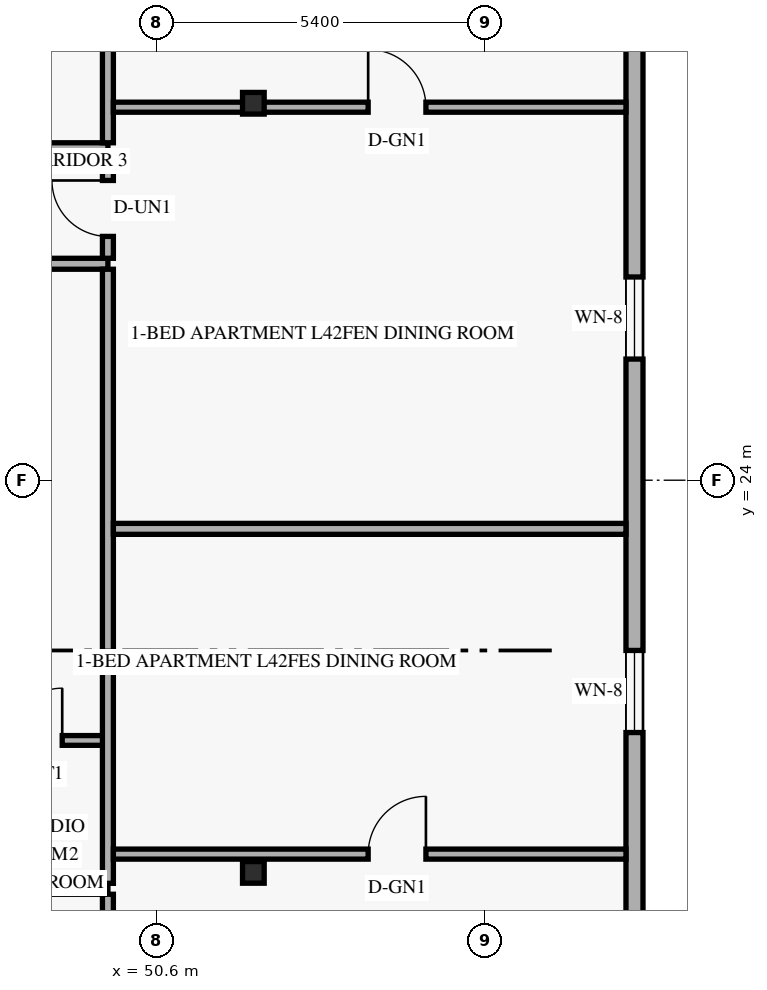
"""IFC4 building model, lengths in metres.
Left out: names, types, materials, properties, quantities, classifications, styles, units other than length and angle.
Written with IfcOpenShell. Run it as: python <this file> out.ifc"""

import sys

from ifc_helpers import new_model, si_unit, direction, frame, frame_2d, origin, origin_2d, place, context, subcontext, project, spatial, rectangle, hollow_rectangle, extrude, element, fill, save


model = new_model("IFC4")
c1 = context("Model", 3, precision=1e-05, world=origin(), true_north=direction((0.0, 1.0)))
c2 = subcontext(c1, "Body", "Model", "MODEL_VIEW")
j1 = project(units=[si_unit("LENGTHUNIT", "METRE"), si_unit("PLANEANGLEUNIT", "RADIAN")], contexts=[c1])
p1 = place(None, origin())
s1 = spatial("IfcSite", under=j1, at=p1, CompositionType="ELEMENT")
p2 = place(p1, origin())
s2 = spatial("IfcBuilding", under=s1, at=p2, CompositionType="ELEMENT")
p3 = place(p2, frame((0.0, 0.0, 162.6)))
s3 = spatial("IfcBuildingStorey", under=s2, at=p3, CompositionType="ELEMENT", Elevation=162.6)
for number, where, z_axis, x_axis in (
    (1, (52.088, 17.55, 0.0), (0.058, 0.0, 0.998), (0.0, 1.0, 0.0)),
    (2, (52.088, 30.2, 0.0), (0.058, 0.0, 0.998), (0.0, 1.0, 0.0)),
):
    element("IfcColumn", number, at=place(p3, frame(where, z_axis=z_axis, x_axis=x_axis)), inside=s3, PredefinedType="COLUMN", context=c2, shape_type="SweptSolid", body=[
        extrude(hollow_rectangle(XDim=0.356, YDim=0.356, WallThickness=0.016, at=origin_2d()), origin(), (0.0, 0.0, 1.0), 3.606),
    ])
p4 = place(p3, frame((58.46, 7.62, 0.0), z_axis=(0.0, 0.0, 1.0), x_axis=(0.0, 1.0, 0.0)))
e3 = element("IfcWall", 3, at=p4, inside=s3, PredefinedType="SOLIDWALL", context=c2, shape_type="SweptSolid", body=[
    extrude(rectangle(XDim=32.76, YDim=0.28, at=frame_2d((16.38, 0.0))), origin(), (0.0, 0.0, 1.0), 3.36),
])
p5 = place(p4, frame((4.44, 0.0, 0.85)))
e4 = element("IfcOpeningElement", 4, at=p5, cuts=e3, PredefinedType="OPENING", context=c2, shape_type="SweptSolid", body=[
    extrude(rectangle(XDim=1.35, YDim=1.55, at=frame_2d((0.675, 0.775))), frame((0.0, 0.15, 0.0), z_axis=(0.0, -1.0, 0.0), x_axis=(1.0, 0.0, 0.0)), (0.0, 0.0, 1.0), 0.3),
])
p6 = place(p4, frame((12.23, 0.0, 0.85)))
e5 = element("IfcOpeningElement", 5, at=p6, cuts=e3, PredefinedType="OPENING", context=c2, shape_type="SweptSolid", body=[
    extrude(rectangle(XDim=1.35, YDim=1.55, at=frame_2d((0.675, 0.775))), frame((0.0, 0.15, 0.0), z_axis=(0.0, -1.0, 0.0), x_axis=(1.0, 0.0, 0.0)), (0.0, 0.0, 1.0), 0.3),
])
p7 = place(p4, frame((18.373, 0.0, 0.85)))
e6 = element("IfcOpeningElement", 6, at=p7, cuts=e3, PredefinedType="OPENING", context=c2, shape_type="SweptSolid", body=[
    extrude(rectangle(XDim=1.35, YDim=1.55, at=frame_2d((0.675, 0.775))), frame((0.0, 0.15, 0.0), z_axis=(0.0, -1.0, 0.0), x_axis=(1.0, 0.0, 0.0)), (0.0, 0.0, 1.0), 0.3),
])
p8 = place(p4, frame((26.963, 0.0, 0.85)))
e7 = element("IfcOpeningElement", 7, at=p8, cuts=e3, PredefinedType="OPENING", context=c2, shape_type="SweptSolid", body=[
    extrude(rectangle(XDim=1.35, YDim=1.55, at=frame_2d((0.675, 0.775))), frame((0.0, 0.15, 0.0), z_axis=(0.0, -1.0, 0.0), x_axis=(1.0, 0.0, 0.0)), (0.0, 0.0, 1.0), 0.3),
])
p9 = place(p3, frame((37.64, 17.28, 0.0), z_axis=(0.0, 0.0, 1.0), x_axis=(1.0, 0.0, 0.0)))
e8 = element("IfcWall", 8, at=p9, inside=s3, PredefinedType="STANDARD", context=c2, shape_type="SweptSolid", body=[
    extrude(rectangle(XDim=12.16, YDim=0.18, at=frame_2d((6.08, 0.0))), origin(), (0.0, 0.0, 1.0), 2.73),
])
p10 = place(p9, frame((6.475, 0.0, 0.0)))
e9 = element("IfcOpeningElement", 9, at=p10, cuts=e8, PredefinedType="OPENING", context=c2, shape_type="SweptSolid", body=[
    extrude(rectangle(XDim=0.92, YDim=2.15, at=frame_2d((0.46, 1.075))), frame((0.0, 0.1, 0.0), z_axis=(0.0, -1.0, 0.0), x_axis=(1.0, 0.0, 0.0)), (0.0, 0.0, 1.0), 0.2),
])
p11 = place(p3, frame((37.64, 27.56, 0.0), z_axis=(0.0, 0.0, 1.0), x_axis=(1.0, 0.0, 0.0)))
e10 = element("IfcWall", 10, at=p11, inside=s3, PredefinedType="STANDARD", context=c2, shape_type="SweptSolid", body=[
    extrude(rectangle(XDim=12.16, YDim=0.18, at=frame_2d((6.08, 0.0))), origin(), (0.0, 0.0, 1.0), 2.73),
])
p12 = place(p3, frame((35.51, 29.46, 0.0), z_axis=(0.0, 0.0, 1.0), x_axis=(1.0, 0.0, 0.0)))
e11 = element("IfcWall", 11, at=p12, inside=s3, PredefinedType="STANDARD", context=c2, shape_type="SweptSolid", body=[
    extrude(rectangle(XDim=14.29, YDim=0.18, at=frame_2d((7.145, 0.0))), origin(), (0.0, 0.0, 1.0), 2.73),
])
p13 = place(p12, frame((0.35, 0.0, 0.0)))
e12 = element("IfcOpeningElement", 12, at=p13, cuts=e11, PredefinedType="OPENING", context=c2, shape_type="SweptSolid", body=[
    extrude(rectangle(XDim=0.92, YDim=2.15, at=frame_2d((0.46, 1.075))), frame((0.0, 0.1, 0.0), z_axis=(0.0, -1.0, 0.0), x_axis=(1.0, 0.0, 0.0)), (0.0, 0.0, 1.0), 0.2),
])
p14 = place(p12, frame((7.828, 0.0, 0.0)))
e13 = element("IfcOpeningElement", 13, at=p14, cuts=e11, PredefinedType="OPENING", context=c2, shape_type="SweptSolid", body=[
    extrude(rectangle(XDim=0.92, YDim=2.15, at=frame_2d((0.46, 1.075))), frame((0.0, 0.1, 0.0), z_axis=(0.0, -1.0, 0.0), x_axis=(1.0, 0.0, 0.0)), (0.0, 0.0, 1.0), 0.2),
])
p15 = place(p3, frame((45.835, 19.72, 0.0), z_axis=(0.0, 0.0, 1.0), x_axis=(1.0, 0.0, 0.0)))
e14 = element("IfcWall", 14, at=p15, inside=s3, PredefinedType="PLUMBINGWALL", context=c2, shape_type="SweptSolid", body=[
    extrude(rectangle(XDim=3.965, YDim=0.16, at=frame_2d((1.982, 0.0))), origin(), (0.0, 0.0, 1.0), 2.73),
])
p16 = place(p15, frame((0.35, 0.0, 0.0)))
e15 = element("IfcOpeningElement", 15, at=p16, cuts=e14, PredefinedType="OPENING", context=c2, shape_type="SweptSolid", body=[
    extrude(rectangle(XDim=0.88, YDim=2.12, at=frame_2d((0.44, 1.06))), frame((0.0, 0.09, 0.0), z_axis=(0.0, -1.0, 0.0), x_axis=(1.0, 0.0, 0.0)), (0.0, 0.0, 1.0), 0.18),
])
p17 = place(p15, frame((2.354, 0.0, 0.0)))
e16 = element("IfcOpeningElement", 16, at=p17, cuts=e14, PredefinedType="OPENING", context=c2, shape_type="SweptSolid", body=[
    extrude(rectangle(XDim=0.86, YDim=2.12, at=frame_2d((0.43, 1.06))), frame((0.0, 0.09, 0.0), z_axis=(0.0, -1.0, 0.0), x_axis=(1.0, 0.0, 0.0)), (0.0, 0.0, 1.0), 0.18),
])
p18 = place(p3, frame((49.8, 15.67, 0.0), z_axis=(0.0, 0.0, 1.0), x_axis=(0.0, 1.0, 0.0)))
e17 = element("IfcWall", 17, at=p18, inside=s3, PredefinedType="STANDARD", context=c2, shape_type="SweptSolid", body=[
    extrude(rectangle(XDim=1.52, YDim=0.18, at=frame_2d((0.76, 0.0))), origin(), (0.0, 0.0, 1.0), 3.36),
])
p19 = place(p18, frame((0.29, 0.0, 0.0)))
e18 = element("IfcOpeningElement", 18, at=p19, cuts=e17, PredefinedType="OPENING", context=c2, shape_type="SweptSolid", body=[
    extrude(rectangle(XDim=0.92, YDim=2.15, at=frame_2d((0.46, 1.075))), frame((0.0, 0.1, 0.0), z_axis=(0.0, -1.0, 0.0), x_axis=(1.0, 0.0, 0.0)), (0.0, 0.0, 1.0), 0.2),
])
p20 = place(p3, frame((49.8, 27.65, 0.0), z_axis=(0.0, 0.0, 1.0), x_axis=(0.0, 1.0, 0.0)))
e19 = element("IfcWall", 19, at=p20, inside=s3, PredefinedType="STANDARD", context=c2, shape_type="SweptSolid", body=[
    extrude(rectangle(XDim=1.72, YDim=0.18, at=frame_2d((0.86, 0.0))), origin(), (0.0, 0.0, 1.0), 3.36),
])
p21 = place(p20, frame((0.36, 0.0, 0.0)))
e20 = element("IfcOpeningElement", 20, at=p21, cuts=e19, PredefinedType="OPENING", context=c2, shape_type="SweptSolid", body=[
    extrude(rectangle(XDim=0.92, YDim=2.15, at=frame_2d((0.46, 1.075))), frame((0.0, 0.1, 0.0), z_axis=(0.0, -1.0, 0.0), x_axis=(1.0, 0.0, 0.0)), (0.0, 0.0, 1.0), 0.2),
])
p22 = place(p3, frame((49.8, 17.37, 0.0), z_axis=(0.0, 0.0, 1.0), x_axis=(0.0, 1.0, 0.0)))
e21 = element("IfcWall", 21, at=p22, inside=s3, PredefinedType="PARTITIONING", context=c2, shape_type="SweptSolid", body=[
    extrude(rectangle(XDim=10.1, YDim=0.18, at=frame_2d((5.05, 0.0))), origin(), (0.0, 0.0, 1.0), 2.73),
])
p23 = place(p3, frame((49.8, 29.55, 0.0), z_axis=(0.0, 0.0, 1.0), x_axis=(0.0, 1.0, 0.0)))
e22 = element("IfcWall", 22, at=p23, inside=s3, PredefinedType="PARTITIONING", context=c2, shape_type="SweptSolid", body=[
    extrude(rectangle(XDim=14.17, YDim=0.18, at=frame_2d((7.085, 0.0))), origin(), (0.0, 0.0, 1.0), 2.73),
])
p24 = place(p3, frame((49.89, 23.2, 0.0), z_axis=(0.0, 0.0, 1.0), x_axis=(1.0, 0.0, 0.0)))
e23 = element("IfcWall", 23, at=p24, inside=s3, PredefinedType="PARTITIONING", context=c2, shape_type="SweptSolid", body=[
    extrude(rectangle(XDim=8.43, YDim=0.18, at=frame_2d((4.215, 0.0))), origin(), (0.0, 0.0, 1.0), 2.879),
])
p25 = place(p3, frame((49.89, 17.851, 0.0), z_axis=(0.0, 0.0, 1.0), x_axis=(1.0, 0.0, 0.0)))
e24 = element("IfcWall", 24, at=p25, inside=s3, PredefinedType="PARTITIONING", context=c2, shape_type="SweptSolid", body=[
    extrude(rectangle(XDim=8.43, YDim=0.165, at=frame_2d((4.215, 0.0))), origin(), (0.0, 0.0, 1.0), 2.879),
])
p26 = place(p25, frame((4.19, 0.0, 0.0)))
e25 = element("IfcOpeningElement", 25, at=p26, cuts=e24, PredefinedType="OPENING", context=c2, shape_type="SweptSolid", body=[
    extrude(rectangle(XDim=0.95, YDim=2.15, at=frame_2d((0.475, 1.075))), frame((0.0, 0.093, 0.0), z_axis=(0.0, -1.0, 0.0), x_axis=(1.0, 0.0, 0.0)), (0.0, 0.0, 1.0), 0.185),
])
p27 = place(p3, frame((49.89, 30.135, 0.0), z_axis=(0.0, 0.0, 1.0), x_axis=(1.0, 0.0, 0.0)))
e26 = element("IfcWall", 26, at=p27, inside=s3, PredefinedType="PARTITIONING", context=c2, shape_type="SweptSolid", body=[
    extrude(rectangle(XDim=8.43, YDim=0.165, at=frame_2d((4.215, 0.0))), origin(), (0.0, 0.0, 1.0), 2.73),
])
p28 = place(p27, frame((4.19, 0.0, 0.0)))
e27 = element("IfcOpeningElement", 27, at=p28, cuts=e26, PredefinedType="OPENING", context=c2, shape_type="SweptSolid", body=[
    extrude(rectangle(XDim=0.95, YDim=2.15, at=frame_2d((0.475, 1.075))), frame((0.0, 0.093, 0.0), z_axis=(0.0, -1.0, 0.0), x_axis=(1.0, 0.0, 0.0)), (0.0, 0.0, 1.0), 0.185),
])
p29 = place(p6, origin())
e28 = element("IfcWindow", 28, at=p29, inside=s3, PartitioningType="SINGLE_PANEL", PredefinedType="WINDOW", context=c2, shape_type="SweptSolid", body=[
    extrude(rectangle(XDim=1.35, YDim=1.55, at=frame_2d((0.675, 0.775))), frame((0.0, 0.03, 0.0), z_axis=(0.0, -1.0, 0.0), x_axis=(1.0, 0.0, 0.0)), (0.0, 0.0, 1.0), 0.06),
])
fill(e5, e28)
p30 = place(p7, origin())
e29 = element("IfcWindow", 29, at=p30, inside=s3, PartitioningType="SINGLE_PANEL", PredefinedType="WINDOW", context=c2, shape_type="SweptSolid", body=[
    extrude(rectangle(XDim=1.35, YDim=1.55, at=frame_2d((0.675, 0.775))), frame((0.0, 0.03, 0.0), z_axis=(0.0, -1.0, 0.0), x_axis=(1.0, 0.0, 0.0)), (0.0, 0.0, 1.0), 0.06),
])
fill(e6, e29)
p31 = place(p17, origin())
e30 = element("IfcDoor", 30, at=p31, inside=s3, OperationType="SINGLE_SWING_RIGHT", PredefinedType="DOOR", context=c2, shape_type="SweptSolid", body=[
    extrude(rectangle(XDim=0.86, YDim=2.12, at=frame_2d((0.43, 1.06))), frame((0.0, 0.025, 0.0), z_axis=(0.0, -1.0, 0.0), x_axis=(1.0, 0.0, 0.0)), (0.0, 0.0, 1.0), 0.05),
])
fill(e16, e30)
p32 = place(p26, origin())
e31 = element("IfcDoor", 31, at=p32, inside=s3, OperationType="SINGLE_SWING_RIGHT", PredefinedType="DOOR", context=c2, shape_type="SweptSolid", body=[
    extrude(rectangle(XDim=0.95, YDim=2.15, at=frame_2d((0.475, 1.075))), frame((0.0, 0.025, 0.0), z_axis=(0.0, -1.0, 0.0), x_axis=(1.0, 0.0, 0.0)), (0.0, 0.0, 1.0), 0.05),
])
fill(e25, e31)
p33 = place(p28, origin())
e32 = element("IfcDoor", 32, at=p33, inside=s3, OperationType="SINGLE_SWING_LEFT", PredefinedType="DOOR", context=c2, shape_type="SweptSolid", body=[
    extrude(rectangle(XDim=0.95, YDim=2.15, at=frame_2d((0.475, 1.075))), frame((0.0, 0.025, 0.0), z_axis=(0.0, -1.0, 0.0), x_axis=(1.0, 0.0, 0.0)), (0.0, 0.0, 1.0), 0.05),
])
fill(e27, e32)
p34 = place(p21, origin())
e33 = element("IfcDoor", 33, at=p34, inside=s3, OperationType="SINGLE_SWING_RIGHT", PredefinedType="DOOR", context=c2, shape_type="SweptSolid", body=[
    extrude(rectangle(XDim=0.92, YDim=2.15, at=frame_2d((0.46, 1.075))), frame((0.0, 0.025, 0.0), z_axis=(0.0, -1.0, 0.0), x_axis=(1.0, 0.0, 0.0)), (0.0, 0.0, 1.0), 0.05),
])
fill(e20, e33)
save(model, sys.argv[1])
